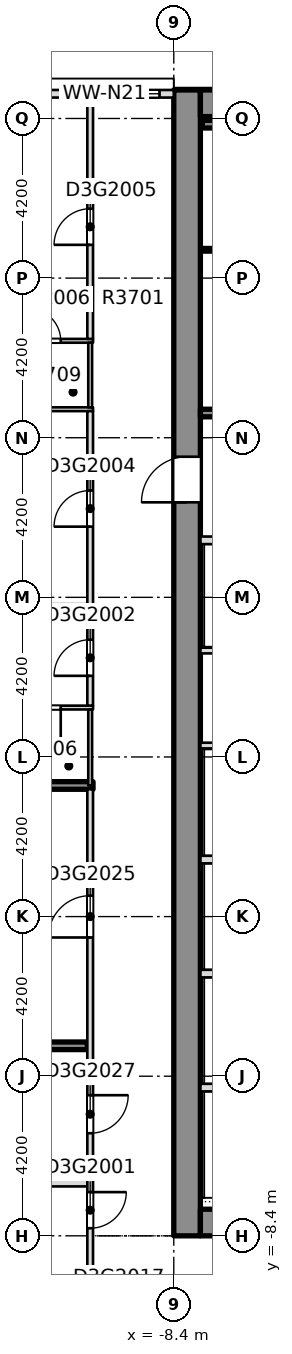
"""IFC4 building model, lengths in metres.
Left out: names, types, materials, properties, quantities, classifications, styles, units other than length and angle.
Written with IfcOpenShell. Run it as: python <this file> out.ifc"""

import sys

from ifc_helpers import new_model, si_unit, direction, frame, frame_2d, origin, place, context, subcontext, project, spatial, rectangle, extrude, element, fill, save


model = new_model("IFC4")
c1 = context("Model", 3, precision=1e-05, world=origin(), true_north=direction((0.0, 1.0)))
c2 = subcontext(c1, "Body", "Model", "MODEL_VIEW")
j1 = project(units=[si_unit("LENGTHUNIT", "METRE"), si_unit("PLANEANGLEUNIT", "RADIAN")], contexts=[c1])
p1 = place(None, origin())
s1 = spatial("IfcSite", under=j1, at=p1, CompositionType="ELEMENT")
p2 = place(p1, origin())
s2 = spatial("IfcBuilding", under=s1, at=p2, CompositionType="ELEMENT")
p3 = place(p2, frame((0.0, 0.0, 146.9)))
s3 = spatial("IfcBuildingStorey", under=s2, at=p3, CompositionType="ELEMENT", Elevation=146.9)
p4 = place(p3, frame((-8.05, -8.4, -0.4), z_axis=(0.0, 0.0, 1.0), x_axis=(0.0, 1.0, 0.0)))
e1 = element("IfcWall", 1, at=p4, inside=s3, PredefinedType="SOLIDWALL", context=c2, shape_type="SweptSolid", body=[
    extrude(rectangle(XDim=30.15, YDim=0.7, at=frame_2d((15.075, 0.0))), origin(), (0.0, 0.0, 1.0), 3.45),
])
p5 = place(p4, frame((19.3, 0.0, 0.4)))
e2 = element("IfcOpeningElement", 2, at=p5, cuts=e1, PredefinedType="OPENING", context=c2, shape_type="SweptSolid", body=[
    extrude(rectangle(XDim=1.2, YDim=2.1, at=frame_2d((0.6, 1.05))), frame((0.0, 0.36, 0.0), z_axis=(0.0, -1.0, 0.0), x_axis=(1.0, 0.0, 0.0)), (0.0, 0.0, 1.0), 0.72),
])
p6 = place(p3, frame((-7.7, -8.05, -0.4), z_axis=(0.0, 0.0, 1.0), x_axis=(1.0, 0.0, 0.0)))
e3 = element("IfcWall", 3, at=p6, inside=s3, PredefinedType="SHEAR", context=c2, shape_type="SweptSolid", body=[
    extrude(rectangle(XDim=15.4, YDim=0.7, at=frame_2d((7.7, 0.0))), origin(), (0.0, 0.0, 1.0), 3.45),
])
p7 = place(p6, frame((2.95, 0.0, 0.4)))
e4 = element("IfcOpeningElement", 4, at=p7, cuts=e3, PredefinedType="OPENING", context=c2, shape_type="SweptSolid", body=[
    extrude(rectangle(XDim=1.8, YDim=2.1, at=frame_2d((0.9, 1.05))), frame((0.0, 0.36, 0.0), z_axis=(0.0, -1.0, 0.0), x_axis=(1.0, 0.0, 0.0)), (0.0, 0.0, 1.0), 0.72),
])
p8 = place(p6, frame((10.65, 0.0, 0.4)))
e5 = element("IfcOpeningElement", 5, at=p8, cuts=e3, PredefinedType="OPENING", context=c2, shape_type="SweptSolid", body=[
    extrude(rectangle(XDim=1.8, YDim=2.1, at=frame_2d((0.9, 1.05))), frame((0.0, 0.36, 0.0), z_axis=(0.0, -1.0, 0.0), x_axis=(1.0, 0.0, 0.0)), (0.0, 0.0, 1.0), 0.72),
])
p9 = place(p3, frame((-7.7, 21.4, -0.4), z_axis=(0.0, 0.0, 1.0), x_axis=(1.0, 0.0, 0.0)))
e6 = element("IfcWall", 6, at=p9, inside=s3, PredefinedType="SHEAR", context=c2, shape_type="SweptSolid", body=[
    extrude(rectangle(XDim=15.4, YDim=0.7, at=frame_2d((7.7, 0.0))), origin(), (0.0, 0.0, 1.0), 3.45),
])
p10 = place(p3, frame((-21.55, -7.0, 0.0), z_axis=(0.0, 0.0, 1.0), x_axis=(1.0, 0.0, 0.0)))
e7 = element("IfcWall", 7, at=p10, inside=s3, PredefinedType="PARTITIONING", context=c2, shape_type="SweptSolid", body=[
    extrude(rectangle(XDim=10.875, YDim=0.2, at=frame_2d((5.438, 0.0))), origin(), (0.0, 0.0, 1.0), 3.05),
])
p11 = place(p3, frame((-13.05, 3.45, 0.0), z_axis=(0.0, 0.0, 1.0), x_axis=(1.0, 0.0, 0.0)))
e8 = element("IfcWall", 8, at=p11, inside=s3, PredefinedType="SOLIDWALL", context=c2, shape_type="SweptSolid", body=[
    extrude(rectangle(XDim=2.525, YDim=0.2, at=frame_2d((1.263, 0.0))), origin(), (0.0, 0.0, 1.0), 3.05),
])
p12 = place(p3, frame((-13.048, 5.5, 0.0), z_axis=(0.0, 0.0, 1.0), x_axis=(1.0, 0.0, 0.0)))
e9 = element("IfcWall", 9, at=p12, inside=s3, PredefinedType="PARTITIONING", context=c2, shape_type="SweptSolid", body=[
    extrude(rectangle(XDim=2.523, YDim=0.1, at=frame_2d((1.262, 0.0))), origin(), (0.0, 0.0, 1.0), 3.05),
])
p13 = place(p12, frame((0.823, 0.0, 0.0)))
e10 = element("IfcOpeningElement", 10, at=p13, cuts=e9, PredefinedType="OPENING", context=c2, shape_type="SweptSolid", body=[
    extrude(rectangle(XDim=0.85, YDim=2.1, at=frame_2d((0.425, 1.05))), frame((0.0, 0.06, 0.0), z_axis=(0.0, -1.0, 0.0), x_axis=(1.0, 0.0, 0.0)), (0.0, 0.0, 1.0), 0.12),
])
p14 = place(p3, frame((-21.55, 8.12, 0.0), z_axis=(0.0, 0.0, 1.0), x_axis=(1.0, 0.0, 0.0)))
e11 = element("IfcWall", 11, at=p14, inside=s3, PredefinedType="PARTITIONING", context=c2, shape_type="SweptSolid", body=[
    extrude(rectangle(XDim=10.875, YDim=0.2, at=frame_2d((5.438, 0.0))), origin(), (0.0, 0.0, 1.0), 3.05),
])
p15 = place(p3, frame((-13.05, 13.35, 0.0), z_axis=(0.0, 0.0, 1.0), x_axis=(1.0, 0.0, 0.0)))
e12 = element("IfcWall", 12, at=p15, inside=s3, PredefinedType="PARTITIONING", context=c2, shape_type="SweptSolid", body=[
    extrude(rectangle(XDim=2.525, YDim=0.1, at=frame_2d((1.263, 0.0))), origin(), (0.0, 0.0, 1.0), 3.05),
])
p16 = place(p3, frame((-13.05, 15.15, 0.0), z_axis=(0.0, 0.0, 1.0), x_axis=(1.0, 0.0, 0.0)))
e13 = element("IfcWall", 13, at=p16, inside=s3, PredefinedType="PARTITIONING", context=c2, shape_type="SweptSolid", body=[
    extrude(rectangle(XDim=2.525, YDim=0.1, at=frame_2d((1.263, 0.0))), origin(), (0.0, 0.0, 1.0), 3.05),
])
p17 = place(p16, frame((0.825, 0.0, 0.0)))
e14 = element("IfcOpeningElement", 14, at=p17, cuts=e13, PredefinedType="OPENING", context=c2, shape_type="SweptSolid", body=[
    extrude(rectangle(XDim=0.85, YDim=2.1, at=frame_2d((0.425, 1.05))), frame((0.0, 0.06, 0.0), z_axis=(0.0, -1.0, 0.0), x_axis=(1.0, 0.0, 0.0)), (0.0, 0.0, 1.0), 0.12),
])
p18 = place(p3, frame((-10.6, -10.525, 0.0), z_axis=(0.0, 0.0, 1.0), x_axis=(0.0, 1.0, 0.0)))
e15 = element("IfcWall", 15, at=p18, inside=s3, PredefinedType="PARTITIONING", context=c2, shape_type="SweptSolid", body=[
    extrude(rectangle(XDim=13.875, YDim=0.15, at=frame_2d((6.938, 0.0))), origin(), (0.0, 0.0, 1.0), 3.05),
])
p19 = place(p18, frame((2.325, 0.0, 0.0)))
e16 = element("IfcOpeningElement", 16, at=p19, cuts=e15, PredefinedType="OPENING", context=c2, shape_type="SweptSolid", body=[
    extrude(rectangle(XDim=0.95, YDim=2.1, at=frame_2d((0.475, 1.05))), frame((0.0, 0.085, 0.0), z_axis=(0.0, -1.0, 0.0), x_axis=(1.0, 0.0, 0.0)), (0.0, 0.0, 1.0), 0.17),
])
p20 = place(p18, frame((9.975, 0.0, 0.0)))
e17 = element("IfcOpeningElement", 17, at=p20, cuts=e15, PredefinedType="OPENING", context=c2, shape_type="SweptSolid", body=[
    extrude(rectangle(XDim=1.1, YDim=2.1, at=frame_2d((0.55, 1.05))), frame((0.0, 0.085, 0.0), z_axis=(0.0, -1.0, 0.0), x_axis=(1.0, 0.0, 0.0)), (0.0, 0.0, 1.0), 0.17),
])
p21 = place(p18, frame((4.825, 0.0, 0.0)))
e18 = element("IfcOpeningElement", 18, at=p21, cuts=e15, PredefinedType="OPENING", context=c2, shape_type="SweptSolid", body=[
    extrude(rectangle(XDim=1.0, YDim=2.1, at=frame_2d((0.5, 1.05))), frame((0.0, 0.085, 0.0), z_axis=(0.0, -1.0, 0.0), x_axis=(1.0, 0.0, 0.0)), (0.0, 0.0, 1.0), 0.17),
])
p22 = place(p3, frame((-10.6, 3.45, 0.0), z_axis=(0.0, 0.0, 1.0), x_axis=(0.0, 1.0, 0.0)))
e19 = element("IfcWall", 19, at=p22, inside=s3, PredefinedType="PARTITIONING", context=c2, shape_type="SweptSolid", body=[
    extrude(rectangle(XDim=2.0, YDim=0.1, at=frame_2d((1.0, 0.0))), origin(), (0.0, 0.0, 1.0), 3.05),
])
p23 = place(p3, frame((-10.6, 5.55, 0.0), z_axis=(0.0, 0.0, 1.0), x_axis=(0.0, 1.0, 0.0)))
e20 = element("IfcWall", 20, at=p23, inside=s3, PredefinedType="PARTITIONING", context=c2, shape_type="SweptSolid", body=[
    extrude(rectangle(XDim=7.75, YDim=0.15, at=frame_2d((3.875, 0.0))), origin(), (0.0, 0.0, 1.0), 3.05),
])
p24 = place(p23, frame((0.785, 0.0, 0.0)))
e21 = element("IfcOpeningElement", 21, at=p24, cuts=e20, PredefinedType="OPENING", context=c2, shape_type="SweptSolid", body=[
    extrude(rectangle(XDim=0.95, YDim=2.1, at=frame_2d((0.475, 1.05))), frame((0.0, 0.085, 0.0), z_axis=(0.0, -1.0, 0.0), x_axis=(1.0, 0.0, 0.0)), (0.0, 0.0, 1.0), 0.17),
])
p25 = place(p23, frame((4.71, 0.0, 0.0)))
e22 = element("IfcOpeningElement", 22, at=p25, cuts=e20, PredefinedType="OPENING", context=c2, shape_type="SweptSolid", body=[
    extrude(rectangle(XDim=0.95, YDim=2.1, at=frame_2d((0.475, 1.05))), frame((0.0, 0.085, 0.0), z_axis=(0.0, -1.0, 0.0), x_axis=(1.0, 0.0, 0.0)), (0.0, 0.0, 1.0), 0.17),
])
p26 = place(p3, frame((-10.6, 13.4, 0.0), z_axis=(0.0, 0.0, 1.0), x_axis=(0.0, 1.0, 0.0)))
e23 = element("IfcWall", 23, at=p26, inside=s3, PredefinedType="PARTITIONING", context=c2, shape_type="SweptSolid", body=[
    extrude(rectangle(XDim=1.7, YDim=0.1, at=frame_2d((0.85, 0.0))), origin(), (0.0, 0.0, 1.0), 3.05),
])
p27 = place(p3, frame((-10.6, 15.2, 0.0), z_axis=(0.0, 0.0, 1.0), x_axis=(0.0, 1.0, 0.0)))
e24 = element("IfcWall", 24, at=p27, inside=s3, PredefinedType="PARTITIONING", context=c2, shape_type="SweptSolid", body=[
    extrude(rectangle(XDim=6.35, YDim=0.15, at=frame_2d((3.175, 0.0))), origin(), (0.0, 0.0, 1.0), 3.05),
])
p28 = place(p27, frame((2.475, 0.0, 0.0)))
e25 = element("IfcOpeningElement", 25, at=p28, cuts=e24, PredefinedType="OPENING", context=c2, shape_type="SweptSolid", body=[
    extrude(rectangle(XDim=0.95, YDim=2.1, at=frame_2d((0.475, 1.05))), frame((0.0, 0.085, 0.0), z_axis=(0.0, -1.0, 0.0), x_axis=(1.0, 0.0, 0.0)), (0.0, 0.0, 1.0), 0.17),
])
p29 = place(p3, frame((-8.4, 21.65, 0.0), z_axis=(0.0, 0.0, 1.0), x_axis=(-1.0, 0.0, 0.0)))
e26 = element("IfcWall", 26, at=p29, inside=s3, PredefinedType="STANDARD", context=c2, shape_type="SweptSolid", body=[
    extrude(rectangle(XDim=3.65, YDim=0.2, at=frame_2d((1.825, 0.0))), origin(), (0.0, 0.0, 1.0), 3.05),
])
p30 = place(p29, frame((0.375, 0.0, 0.2)))
e27 = element("IfcOpeningElement", 27, at=p30, cuts=e26, PredefinedType="OPENING", context=c2, shape_type="SweptSolid", body=[
    extrude(rectangle(XDim=1.8, YDim=2.65, at=frame_2d((0.9, 1.325))), frame((0.0, 0.11, 0.0), z_axis=(0.0, -1.0, 0.0), x_axis=(1.0, 0.0, 0.0)), (0.0, 0.0, 1.0), 0.22),
])
for number, where, z_axis, x_axis in (
    (28, (-7.699, -4.5, 0.0), (0.0, 0.0, 1.0), (1.0, 0.0, 0.0)),
    (29, (-7.699, -1.5, 0.0), (0.0, 0.0, 1.0), (1.0, 0.0, 0.0)),
    (30, (-7.699, 1.5, 0.0), (0.0, 0.0, 1.0), (1.0, 0.0, 0.0)),
):
    element("IfcWall", number, at=place(p3, frame(where, z_axis=z_axis, x_axis=x_axis)), inside=s3, PredefinedType="PARTITIONING", context=c2, shape_type="SweptSolid", body=[
        extrude(rectangle(XDim=2.124, YDim=0.2, at=frame_2d((1.062, 0.0))), origin(), (0.0, 0.0, 1.0), 3.05),
    ])
p31 = place(p3, frame((-7.699, 4.5, 0.0), z_axis=(0.0, 0.0, 1.0), x_axis=(1.0, 0.0, 0.0)))
e31 = element("IfcWall", 31, at=p31, inside=s3, PredefinedType="PARTITIONING", context=c2, shape_type="SweptSolid", body=[
    extrude(rectangle(XDim=2.274, YDim=0.15, at=frame_2d((1.137, 0.0))), origin(), (0.0, 0.0, 1.0), 3.05),
])
p32 = place(p3, frame((-7.699, 7.0, 0.0), z_axis=(0.0, 0.0, 1.0), x_axis=(1.0, 0.0, 0.0)))
e32 = element("IfcWall", 32, at=p32, inside=s3, PredefinedType="PARTITIONING", context=c2, shape_type="SweptSolid", body=[
    extrude(rectangle(XDim=15.398, YDim=0.15, at=frame_2d((7.699, 0.0))), origin(), (0.0, 0.0, 1.0), 3.05),
])
p33 = place(p32, frame((6.999, 0.0, 0.0)))
e33 = element("IfcOpeningElement", 33, at=p33, cuts=e32, PredefinedType="OPENING", context=c2, shape_type="SweptSolid", body=[
    extrude(rectangle(XDim=1.4, YDim=2.1, at=frame_2d((0.7, 1.05))), frame((0.0, 0.085, 0.0), z_axis=(0.0, -1.0, 0.0), x_axis=(1.0, 0.0, 0.0)), (0.0, 0.0, 1.0), 0.17),
])
p34 = place(p3, frame((-7.699, 9.9, 0.0), z_axis=(0.0, 0.0, 1.0), x_axis=(1.0, 0.0, 0.0)))
e34 = element("IfcWall", 34, at=p34, inside=s3, PredefinedType="PARTITIONING", context=c2, shape_type="SweptSolid", body=[
    extrude(rectangle(XDim=4.099, YDim=0.2, at=frame_2d((2.049, 0.0))), origin(), (0.0, 0.0, 1.0), 3.05),
])
p35 = place(p34, frame((0.749, 0.0, 0.0)))
e35 = element("IfcOpeningElement", 35, at=p35, cuts=e34, PredefinedType="OPENING", context=c2, shape_type="SweptSolid", body=[
    extrude(rectangle(XDim=1.1, YDim=2.1, at=frame_2d((0.55, 1.05))), frame((0.0, 0.11, 0.0), z_axis=(0.0, -1.0, 0.0), x_axis=(1.0, 0.0, 0.0)), (0.0, 0.0, 1.0), 0.22),
])
p36 = place(p3, frame((-7.699, 13.25, 0.0), z_axis=(0.0, 0.0, 1.0), x_axis=(1.0, 0.0, 0.0)))
e36 = element("IfcWall", 36, at=p36, inside=s3, PredefinedType="SOLIDWALL", context=c2, shape_type="SweptSolid", body=[
    extrude(rectangle(XDim=4.274, YDim=0.2, at=frame_2d((2.137, 0.0))), origin(), (0.0, 0.0, 1.0), 3.05),
])
p37 = place(p36, frame((1.249, 0.0, 0.0)))
e37 = element("IfcOpeningElement", 37, at=p37, cuts=e36, PredefinedType="OPENING", context=c2, shape_type="SweptSolid", body=[
    extrude(rectangle(XDim=1.2, YDim=2.1, at=frame_2d((0.6, 1.05))), frame((0.0, 0.11, 0.0), z_axis=(0.0, -1.0, 0.0), x_axis=(1.0, 0.0, 0.0)), (0.0, 0.0, 1.0), 0.22),
])
p38 = place(p3, frame((-7.65, 20.85, 0.0), z_axis=(0.0, 0.0, 1.0), x_axis=(1.0, 0.0, 0.0)))
e38 = element("IfcWall", 38, at=p38, inside=s3, PredefinedType="SOLIDWALL", context=c2, shape_type="SweptSolid", body=[
    extrude(rectangle(XDim=3.5, YDim=0.2, at=frame_2d((1.75, 0.0))), origin(), (0.0, 0.0, 1.0), 3.05),
])
p39 = place(p3, frame((-21.55, -3.4, 0.0), z_axis=(0.0, 0.0, 1.0), x_axis=(1.0, 0.0, 0.0)))
e39 = element("IfcWall", 39, at=p39, inside=s3, PredefinedType="SOLIDWALL", context=c2, shape_type="SweptSolid", body=[
    extrude(rectangle(XDim=10.875, YDim=0.2, at=frame_2d((5.438, 0.0))), origin(), (0.0, 0.0, 1.0), 3.05),
])
p40 = place(p19, origin())
e40 = element("IfcDoor", 40, at=p40, inside=s3, OperationType="SINGLE_SWING_RIGHT", PredefinedType="DOOR", context=c2, shape_type="SweptSolid", body=[
    extrude(rectangle(XDim=0.95, YDim=2.1, at=frame_2d((0.475, 1.05))), frame((0.0, 0.025, 0.0), z_axis=(0.0, -1.0, 0.0), x_axis=(1.0, 0.0, 0.0)), (0.0, 0.0, 1.0), 0.05),
])
fill(e16, e40)
p41 = place(p24, origin())
e41 = element("IfcDoor", 41, at=p41, inside=s3, OperationType="SINGLE_SWING_LEFT", PredefinedType="DOOR", context=c2, shape_type="SweptSolid", body=[
    extrude(rectangle(XDim=0.95, YDim=2.1, at=frame_2d((0.475, 1.05))), frame((0.0, 0.025, 0.0), z_axis=(0.0, -1.0, 0.0), x_axis=(1.0, 0.0, 0.0)), (0.0, 0.0, 1.0), 0.05),
])
fill(e21, e41)
p42 = place(p13, origin())
e42 = element("IfcDoor", 42, at=p42, inside=s3, OperationType="SINGLE_SWING_RIGHT", PredefinedType="DOOR", context=c2, shape_type="SweptSolid", body=[
    extrude(rectangle(XDim=0.85, YDim=2.1, at=frame_2d((0.425, 1.05))), frame((0.0, 0.025, 0.0), z_axis=(0.0, -1.0, 0.0), x_axis=(1.0, 0.0, 0.0)), (0.0, 0.0, 1.0), 0.05),
])
fill(e10, e42)
p43 = place(p25, origin())
e43 = element("IfcDoor", 43, at=p43, inside=s3, OperationType="SINGLE_SWING_RIGHT", PredefinedType="DOOR", context=c2, shape_type="SweptSolid", body=[
    extrude(rectangle(XDim=0.95, YDim=2.1, at=frame_2d((0.475, 1.05))), frame((0.0, 0.025, 0.0), z_axis=(0.0, -1.0, 0.0), x_axis=(1.0, 0.0, 0.0)), (0.0, 0.0, 1.0), 0.05),
])
fill(e22, e43)
p44 = place(p28, origin())
e44 = element("IfcDoor", 44, at=p44, inside=s3, OperationType="SINGLE_SWING_RIGHT", PredefinedType="DOOR", context=c2, shape_type="SweptSolid", body=[
    extrude(rectangle(XDim=0.95, YDim=2.1, at=frame_2d((0.475, 1.05))), frame((0.0, 0.025, 0.0), z_axis=(0.0, -1.0, 0.0), x_axis=(1.0, 0.0, 0.0)), (0.0, 0.0, 1.0), 0.05),
])
fill(e25, e44)
p45 = place(p17, origin())
e45 = element("IfcDoor", 45, at=p45, inside=s3, OperationType="SINGLE_SWING_RIGHT", PredefinedType="DOOR", context=c2, shape_type="SweptSolid", body=[
    extrude(rectangle(XDim=0.85, YDim=2.1, at=frame_2d((0.425, 1.05))), frame((0.0, 0.025, 0.0), z_axis=(0.0, -1.0, 0.0), x_axis=(1.0, 0.0, 0.0)), (0.0, 0.0, 1.0), 0.05),
])
fill(e14, e45)
p46 = place(p20, origin())
e46 = element("IfcDoor", 46, at=p46, inside=s3, OperationType="SINGLE_SWING_RIGHT", PredefinedType="DOOR", context=c2, shape_type="SweptSolid", body=[
    extrude(rectangle(XDim=1.1, YDim=2.1, at=frame_2d((0.55, 1.05))), frame((0.0, 0.025, 0.0), z_axis=(0.0, -1.0, 0.0), x_axis=(1.0, 0.0, 0.0)), (0.0, 0.0, 1.0), 0.05),
])
fill(e17, e46)
p47 = place(p21, origin())
e47 = element("IfcDoor", 47, at=p47, inside=s3, OperationType="SINGLE_SWING_RIGHT", PredefinedType="DOOR", context=c2, shape_type="SweptSolid", body=[
    extrude(rectangle(XDim=1.0, YDim=2.1, at=frame_2d((0.5, 1.05))), frame((0.0, 0.025, 0.0), z_axis=(0.0, -1.0, 0.0), x_axis=(1.0, 0.0, 0.0)), (0.0, 0.0, 1.0), 0.05),
])
fill(e18, e47)
p48 = place(p30, origin())
e48 = element("IfcWindow", 48, at=p48, inside=s3, PartitioningType="SINGLE_PANEL", PredefinedType="WINDOW", context=c2, shape_type="SweptSolid", body=[
    extrude(rectangle(XDim=1.8, YDim=2.65, at=frame_2d((0.9, 1.325))), frame((0.0, 0.03, 0.0), z_axis=(0.0, -1.0, 0.0), x_axis=(1.0, 0.0, 0.0)), (0.0, 0.0, 1.0), 0.06),
])
fill(e27, e48)
p49 = place(p5, origin())
e49 = element("IfcDoor", 49, at=p49, inside=s3, OperationType="SINGLE_SWING_LEFT", PredefinedType="DOOR", context=c2, shape_type="SweptSolid", body=[
    extrude(rectangle(XDim=1.2, YDim=2.1, at=frame_2d((0.6, 1.05))), frame((0.0, 0.025, 0.0), z_axis=(0.0, -1.0, 0.0), x_axis=(1.0, 0.0, 0.0)), (0.0, 0.0, 1.0), 0.05),
])
fill(e2, e49)
save(model, sys.argv[1])
